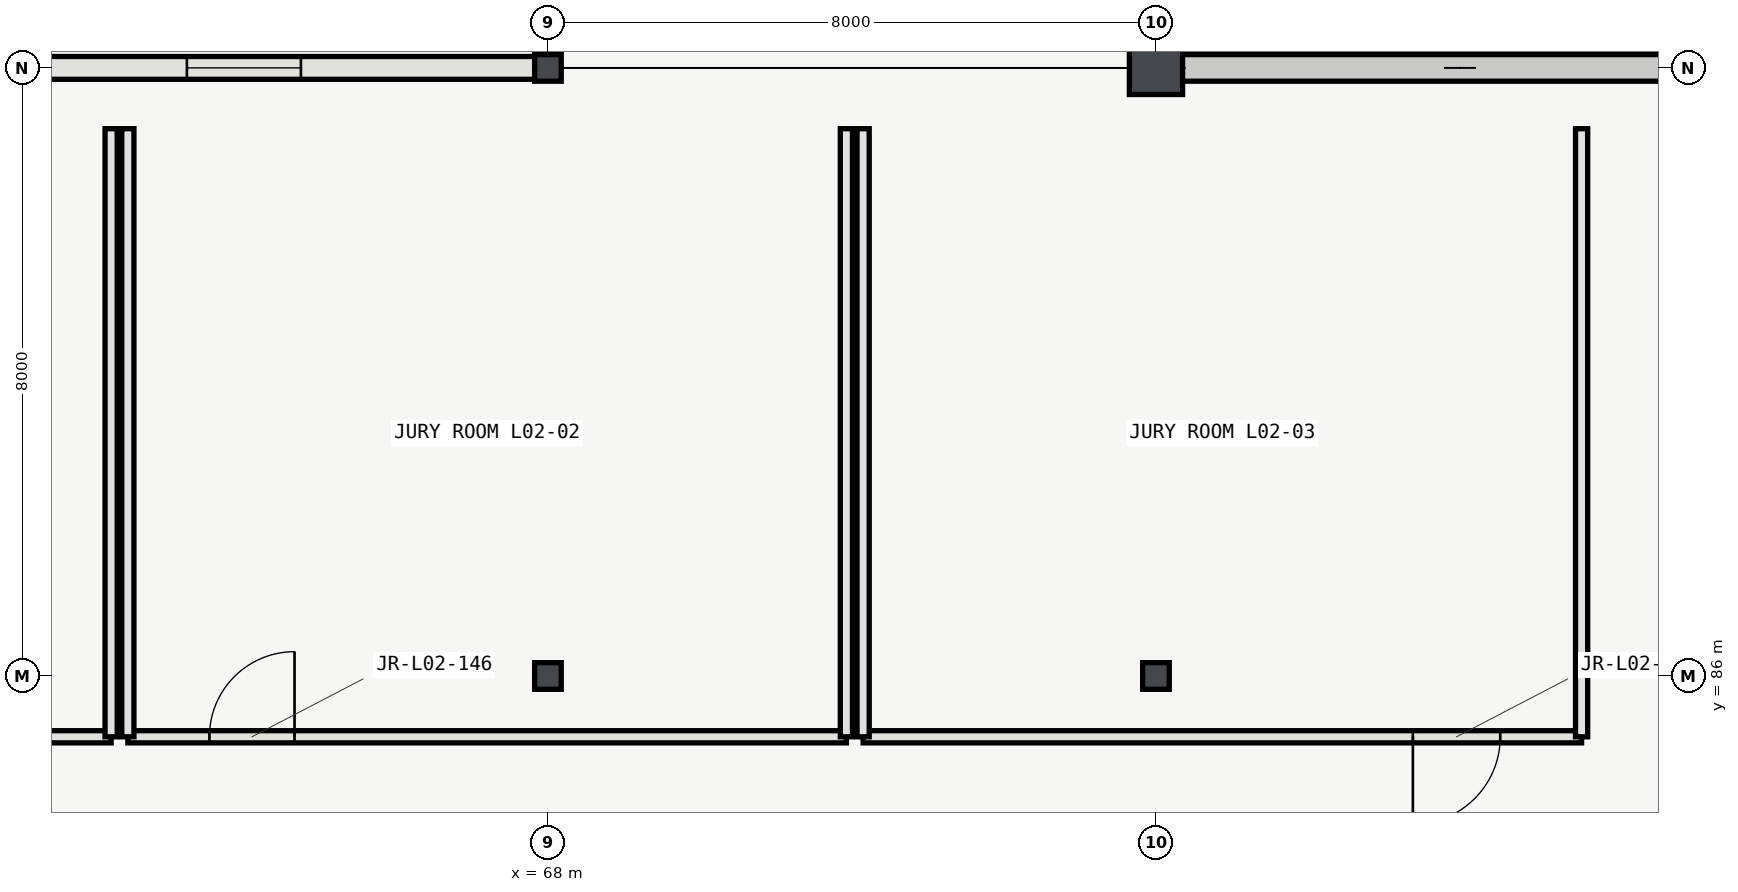
"""IFC4 building model, lengths in metres.
Left out: names, types, materials, properties, quantities, classifications, styles, units other than length and angle.
Written with IfcOpenShell. Run it as: python <this file> out.ifc"""

import sys

from ifc_helpers import new_model, si_unit, direction, frame, frame_2d, origin, origin_2d, place, context, subcontext, project, spatial, rectangle, i_section, extrude, element, fill, save


model = new_model("IFC4")
c1 = context("Model", 3, precision=1e-05, world=origin(), true_north=direction((0.0, 1.0)))
c2 = subcontext(c1, "Body", "Model", "MODEL_VIEW")
j1 = project(units=[si_unit("LENGTHUNIT", "METRE"), si_unit("PLANEANGLEUNIT", "RADIAN")], contexts=[c1])
p1 = place(None, origin())
s1 = spatial("IfcSite", under=j1, at=p1, CompositionType="ELEMENT")
p2 = place(p1, origin())
s2 = spatial("IfcBuilding", under=s1, at=p2, CompositionType="ELEMENT")
p3 = place(p2, frame((0.0, 0.0, 10.8)))
s3 = spatial("IfcBuildingStorey", under=s2, at=p3, CompositionType="ELEMENT", Elevation=10.8)
for number, where, z_axis, x_axis in (
    (1, (68.0, 86.0, 0.0), (0.0, 0.0, 1.0), (1.0, 0.0, 0.0)),
    (2, (68.0, 94.0, 0.0), (0.0, 0.0, 1.0), (1.0, 0.0, 0.0)),
    (3, (76.0, 86.0, 0.0), (0.0, 0.0, 1.0), (1.0, 0.0, 0.0)),
):
    element("IfcColumn", number, at=place(p3, frame(where, z_axis=z_axis, x_axis=x_axis)), inside=s3, PredefinedType="COLUMN", context=c2, shape_type="SweptSolid", body=[
        extrude(i_section(OverallWidth=0.35, OverallDepth=0.35, WebThickness=0.012, FlangeThickness=0.019, FilletRadius=0.02, at=origin_2d()), origin(), (0.0, 0.0, 1.0), 5.4),
    ])
p4 = place(p3, frame((76.0, 94.0, 0.0), z_axis=(0.0, 0.0, 1.0), x_axis=(1.0, 0.0, 0.0)))
e4 = element("IfcColumn", 4, at=p4, inside=s3, PredefinedType="COLUMN", context=c2, shape_type="SweptSolid", body=[
    extrude(rectangle(XDim=0.7, YDim=0.7, at=origin_2d()), origin(), (0.0, 0.0, 1.0), 5.4),
])
p5 = place(p3, frame((67.829, 94.0, 0.0), z_axis=(0.0, 0.0, 1.0), x_axis=(-1.0, 0.0, 0.0)))
e5 = element("IfcWall", 5, at=p5, inside=s3, PredefinedType="SOLIDWALL", context=c2, shape_type="SweptSolid", body=[
    extrude(rectangle(XDim=7.658, YDim=0.3, at=frame_2d((3.829, 0.0))), origin(), (0.0, 0.0, 1.0), 4.763),
])
p6 = place(p5, frame((3.079, 0.0, 0.95)))
e6 = element("IfcOpeningElement", 6, at=p6, cuts=e5, PredefinedType="OPENING", context=c2, shape_type="SweptSolid", body=[
    extrude(rectangle(XDim=1.5, YDim=2.1, at=frame_2d((0.75, 1.05))), frame((0.0, 0.16, 0.0), z_axis=(0.0, -1.0, 0.0), x_axis=(1.0, 0.0, 0.0)), (0.0, 0.0, 1.0), 0.32),
])
p7 = place(p3, frame((75.825, 94.0, 0.0), z_axis=(0.0, 0.0, 1.0), x_axis=(1.0, 0.0, 0.0)))
e7 = element("IfcWall", 7, at=p7, inside=s3, PredefinedType="SHEAR", context=c2, shape_type="SweptSolid", body=[
    extrude(rectangle(XDim=8.35, YDim=0.35, at=frame_2d((4.175, 0.0))), origin(), (0.0, 0.0, 1.0), 5.12),
])
p8 = place(p3, frame((76.0, 94.175, 0.0), z_axis=(0.0, 0.0, 1.0), x_axis=(0.0, 1.0, 0.0)))
e8 = element("IfcWall", 8, at=p8, inside=s3, PredefinedType="SHEAR", context=c2, shape_type="SweptSolid", body=[
    extrude(rectangle(XDim=8.65, YDim=0.35, at=frame_2d((4.325, 0.0))), origin(), (0.0, 0.0, 1.0), 5.12),
])
p9 = place(p8, frame((1.65, 0.0, 0.0)))
e9 = element("IfcOpeningElement", 9, at=p9, cuts=e8, PredefinedType="OPENING", context=c2, shape_type="SweptSolid", body=[
    extrude(rectangle(XDim=1.35, YDim=2.2, at=frame_2d((0.675, 1.1))), frame((0.0, 0.185, 0.0), z_axis=(0.0, -1.0, 0.0), x_axis=(1.0, 0.0, 0.0)), (0.0, 0.0, 1.0), 0.37),
])
p10 = place(p3, frame((52.8, 85.2, 0.0), z_axis=(0.0, 0.0, 1.0), x_axis=(1.0, 0.0, 0.0)))
e10 = element("IfcWall", 10, at=p10, inside=s3, PredefinedType="PARTITIONING", context=c2, shape_type="SweptSolid", body=[
    extrude(rectangle(XDim=9.453, YDim=0.16, at=frame_2d((4.727, 0.0))), origin(), (0.0, 0.0, 1.0), 5.12),
])
p11 = place(p10, frame((2.611, 0.0, 0.0)))
e11 = element("IfcOpeningElement", 11, at=p11, cuts=e10, PredefinedType="OPENING", context=c2, shape_type="SweptSolid", body=[
    extrude(rectangle(XDim=1.15, YDim=2.2, at=frame_2d((0.575, 1.1))), frame((0.0, 0.09, 0.0), z_axis=(0.0, -1.0, 0.0), x_axis=(1.0, 0.0, 0.0)), (0.0, 0.0, 1.0), 0.18),
])
p12 = place(p3, frame((62.253, 85.2, 0.0), z_axis=(0.0, 0.0, 1.0), x_axis=(0.0, 1.0, 0.0)))
e12 = element("IfcWall", 12, at=p12, inside=s3, PredefinedType="PARTITIONING", context=c2, shape_type="SweptSolid", body=[
    extrude(rectangle(XDim=8.0, YDim=0.16, at=frame_2d((4.0, 0.0))), origin(), (0.0, 0.0, 1.0), 5.12),
])
p13 = place(p3, frame((62.473, 85.2, 0.0), z_axis=(0.0, 0.0, 1.0), x_axis=(1.0, 0.0, 0.0)))
e13 = element("IfcWall", 13, at=p13, inside=s3, PredefinedType="PARTITIONING", context=c2, shape_type="SweptSolid", body=[
    extrude(rectangle(XDim=9.454, YDim=0.16, at=frame_2d((4.727, 0.0))), origin(), (0.0, 0.0, 1.0), 5.12),
])
p14 = place(p13, frame((1.073, 0.0, 0.0)))
e14 = element("IfcOpeningElement", 14, at=p14, cuts=e13, PredefinedType="OPENING", context=c2, shape_type="SweptSolid", body=[
    extrude(rectangle(XDim=1.12, YDim=2.2, at=frame_2d((0.56, 1.1))), frame((0.0, 0.09, 0.0), z_axis=(0.0, -1.0, 0.0), x_axis=(1.0, 0.0, 0.0)), (0.0, 0.0, 1.0), 0.18),
])
p15 = place(p3, frame((62.473, 93.2, 0.0), z_axis=(0.0, 0.0, 1.0), x_axis=(0.0, -1.0, 0.0)))
e15 = element("IfcWall", 15, at=p15, inside=s3, PredefinedType="PARTITIONING", context=c2, shape_type="SweptSolid", body=[
    extrude(rectangle(XDim=8.0, YDim=0.16, at=frame_2d((4.0, 0.0))), origin(), (0.0, 0.0, 1.0), 5.12),
])
p16 = place(p3, frame((71.927, 85.2, 0.0), z_axis=(0.0, 0.0, 1.0), x_axis=(0.0, 1.0, 0.0)))
e16 = element("IfcWall", 16, at=p16, inside=s3, PredefinedType="PARTITIONING", context=c2, shape_type="SweptSolid", body=[
    extrude(rectangle(XDim=8.0, YDim=0.16, at=frame_2d((4.0, 0.0))), origin(), (0.0, 0.0, 1.0), 4.812),
])
p17 = place(p3, frame((72.147, 85.2, 0.0), z_axis=(0.0, 0.0, 1.0), x_axis=(1.0, 0.0, 0.0)))
e17 = element("IfcWall", 17, at=p17, inside=s3, PredefinedType="PARTITIONING", context=c2, shape_type="SweptSolid", body=[
    extrude(rectangle(XDim=9.453, YDim=0.16, at=frame_2d((4.727, 0.0))), origin(), (0.0, 0.0, 1.0), 5.12),
])
p18 = place(p17, frame((7.233, 0.0, 0.0)))
e18 = element("IfcOpeningElement", 18, at=p18, cuts=e17, PredefinedType="OPENING", context=c2, shape_type="SweptSolid", body=[
    extrude(rectangle(XDim=1.15, YDim=2.2, at=frame_2d((0.575, 1.1))), frame((0.0, 0.09, 0.0), z_axis=(0.0, -1.0, 0.0), x_axis=(1.0, 0.0, 0.0)), (0.0, 0.0, 1.0), 0.18),
])
p19 = place(p3, frame((72.147, 93.2, 0.0), z_axis=(0.0, 0.0, 1.0), x_axis=(0.0, -1.0, 0.0)))
e19 = element("IfcWall", 19, at=p19, inside=s3, PredefinedType="PARTITIONING", context=c2, shape_type="SweptSolid", body=[
    extrude(rectangle(XDim=8.0, YDim=0.16, at=frame_2d((4.0, 0.0))), origin(), (0.0, 0.0, 1.0), 4.812),
])
p20 = place(p3, frame((81.6, 85.2, 0.0), z_axis=(0.0, 0.0, 1.0), x_axis=(0.0, 1.0, 0.0)))
e20 = element("IfcWall", 20, at=p20, inside=s3, PredefinedType="PARTITIONING", context=c2, shape_type="SweptSolid", body=[
    extrude(rectangle(XDim=8.0, YDim=0.16, at=frame_2d((4.0, 0.0))), origin(), (0.0, 0.0, 1.0), 5.12),
])
p21 = place(p6, origin())
e21 = element("IfcWindow", 21, at=p21, inside=s3, PartitioningType="SINGLE_PANEL", PredefinedType="WINDOW", context=c2, shape_type="SweptSolid", body=[
    extrude(rectangle(XDim=1.5, YDim=2.1, at=frame_2d((0.75, 1.05))), frame((0.0, 0.03, 0.0), z_axis=(0.0, -1.0, 0.0), x_axis=(1.0, 0.0, 0.0)), (0.0, 0.0, 1.0), 0.06),
])
fill(e6, e21)
p22 = place(p14, origin())
e22 = element("IfcDoor", 22, at=p22, inside=s3, OperationType="SINGLE_SWING_RIGHT", PredefinedType="DOOR", context=c2, shape_type="SweptSolid", body=[
    extrude(rectangle(XDim=1.12, YDim=2.2, at=frame_2d((0.56, 1.1))), frame((0.0, 0.025, 0.0), z_axis=(0.0, -1.0, 0.0), x_axis=(1.0, 0.0, 0.0)), (0.0, 0.0, 1.0), 0.05),
])
fill(e14, e22)
p23 = place(p18, origin())
e23 = element("IfcDoor", 23, at=p23, inside=s3, OperationType="SINGLE_SWING_LEFT", PredefinedType="DOOR", context=c2, shape_type="SweptSolid", body=[
    extrude(rectangle(XDim=1.15, YDim=2.2, at=frame_2d((0.575, 1.1))), frame((0.0, 0.025, 0.0), z_axis=(0.0, -1.0, 0.0), x_axis=(1.0, 0.0, 0.0)), (0.0, 0.0, 1.0), 0.05),
])
fill(e18, e23)
save(model, sys.argv[1])
